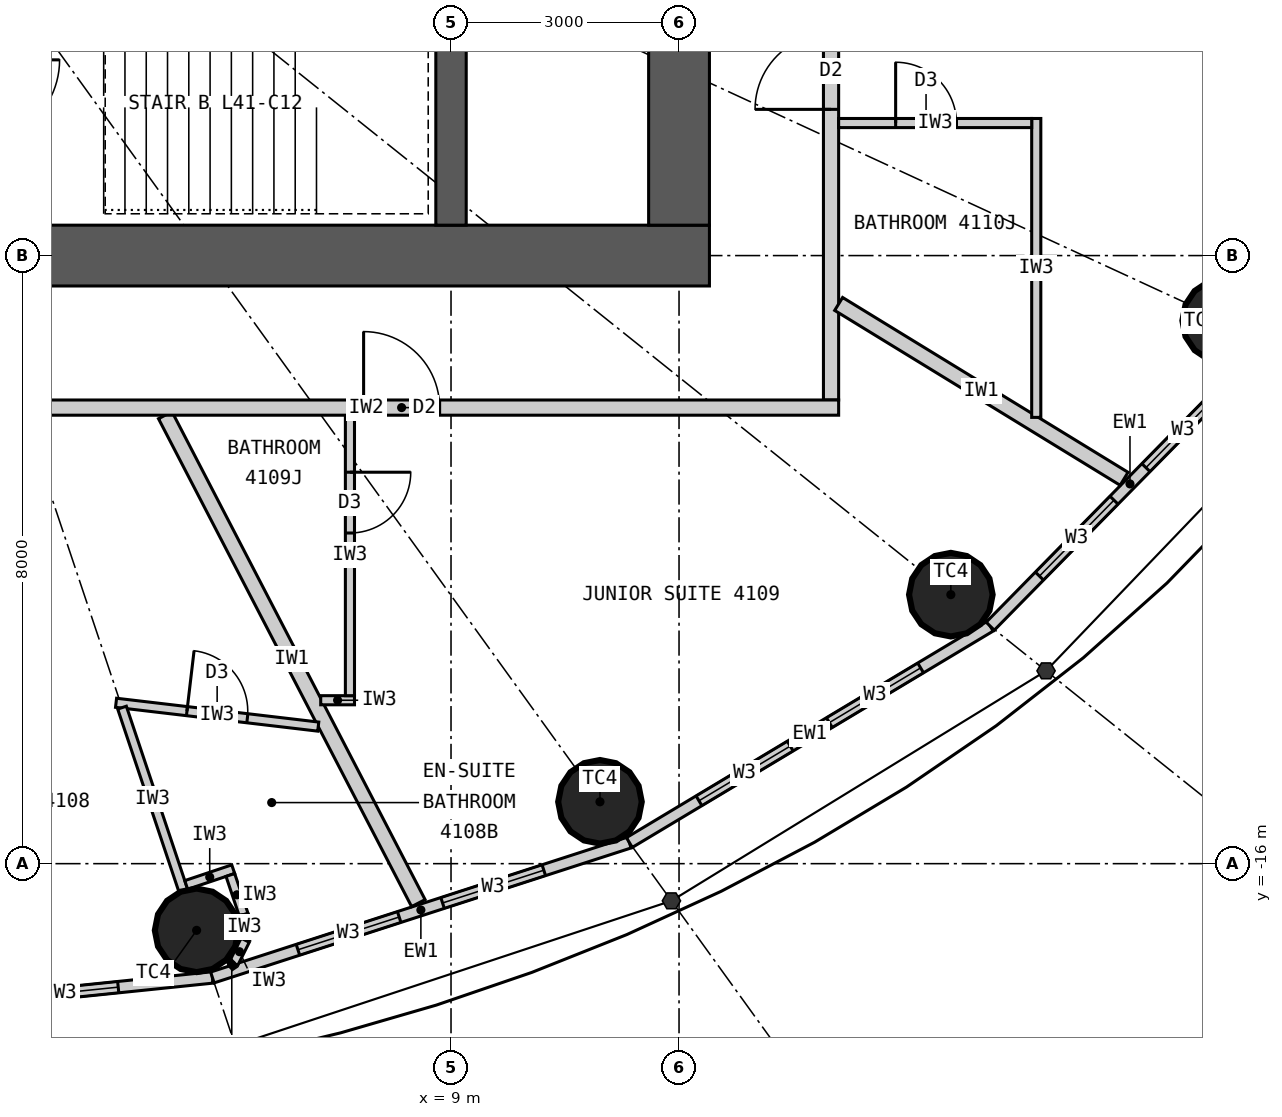
"""IFC4 building model, lengths in metres.
Left out: names, types, materials, properties, quantities, classifications, styles, units other than length and angle.
Written with IfcOpenShell. Run it as: python <this file> out.ifc"""

import sys

from ifc_helpers import new_model, si_unit, direction, frame, frame_2d, origin, origin_2d, place, context, subcontext, project, spatial, rectangle, circle, extrude, element, fill, save


model = new_model("IFC4")
c1 = context("Model", 3, precision=1e-05, world=origin(), true_north=direction((0.0, 1.0)))
c2 = subcontext(c1, "Body", "Model", "MODEL_VIEW")
j1 = project(units=[si_unit("LENGTHUNIT", "METRE"), si_unit("PLANEANGLEUNIT", "RADIAN")], contexts=[c1])
p1 = place(None, origin())
s1 = spatial("IfcSite", under=j1, at=p1, CompositionType="ELEMENT")
p2 = place(p1, origin())
s2 = spatial("IfcBuilding", under=s1, at=p2, CompositionType="ELEMENT")
p3 = place(p2, frame((0.0, 0.0, 156.6)))
s3 = spatial("IfcBuildingStorey", under=s2, at=p3, CompositionType="ELEMENT", Elevation=156.6)
for number, where, z_axis, x_axis in (
    (1, (5.653, -16.877, 0.0), (0.0, 0.0, 1.0), (1.0, 0.0, 0.0)),
    (2, (10.96, -15.186, 0.0), (0.0, 0.0, 1.0), (1.0, 0.0, 0.0)),
    (3, (15.576, -12.461, 0.0), (0.0, 0.0, 1.0), (1.0, 0.0, 0.0)),
    (4, (19.172, -8.855, 0.0), (0.0, 0.0, 1.0), (1.0, 0.0, 0.0)),
):
    element("IfcColumn", number, at=place(p3, frame(where, z_axis=z_axis, x_axis=x_axis)), inside=s3, PredefinedType="COLUMN", context=c2, shape_type="SweptSolid", body=[
        extrude(circle(Radius=0.55, at=origin_2d()), origin(), (0.0, 0.0, 1.0), 3.3),
    ])
p4 = place(p3, frame((12.4, -8.0, 0.0), z_axis=(0.0, 0.0, 1.0), x_axis=(-1.0, 0.0, 0.0)))
e5 = element("IfcWall", 5, at=p4, inside=s3, PredefinedType="SHEAR", context=c2, shape_type="SweptSolid", body=[
    extrude(rectangle(XDim=24.8, YDim=0.8, at=frame_2d((12.4, 0.0))), origin(), (0.0, 0.0, 1.0), 3.3),
])
p5 = place(p4, frame((11.1, 0.0, 0.0)))
e6 = element("IfcOpeningElement", 6, at=p5, cuts=e5, PredefinedType="OPENING", context=c2, shape_type="SweptSolid", body=[
    extrude(rectangle(XDim=1.2, YDim=2.2, at=frame_2d((0.6, 1.1))), frame((0.0, 0.41, 0.0), z_axis=(0.0, -1.0, 0.0), x_axis=(1.0, 0.0, 0.0)), (0.0, 0.0, 1.0), 0.82),
])
p6 = place(p4, frame((18.7, 0.0, 0.0)))
e7 = element("IfcOpeningElement", 7, at=p6, cuts=e5, PredefinedType="OPENING", context=c2, shape_type="SweptSolid", body=[
    extrude(rectangle(XDim=0.9, YDim=2.2, at=frame_2d((0.45, 1.1))), frame((0.0, 0.41, 0.0), z_axis=(0.0, -1.0, 0.0), x_axis=(1.0, 0.0, 0.0)), (0.0, 0.0, 1.0), 0.82),
])
p7 = place(p3, frame((12.0, -7.6, 0.0), z_axis=(0.0, 0.0, 1.0), x_axis=(0.0, 1.0, 0.0)))
e8 = element("IfcWall", 8, at=p7, inside=s3, PredefinedType="SHEAR", context=c2, shape_type="SweptSolid", body=[
    extrude(rectangle(XDim=15.2, YDim=0.8, at=frame_2d((7.6, 0.0))), origin(), (0.0, 0.0, 1.0), 3.3),
])
p8 = place(p7, frame((6.7, 0.0, 0.0)))
e9 = element("IfcOpeningElement", 9, at=p8, cuts=e8, PredefinedType="OPENING", context=c2, shape_type="SweptSolid", body=[
    extrude(rectangle(XDim=1.8, YDim=2.2, at=frame_2d((0.9, 1.1))), frame((0.0, 0.41, 0.0), z_axis=(0.0, -1.0, 0.0), x_axis=(1.0, 0.0, 0.0)), (0.0, 0.0, 1.0), 0.82),
])
p9 = place(p3, frame((9.0, -7.6, 0.0), z_axis=(0.0, 0.0, 1.0), x_axis=(0.0, 1.0, 0.0)))
e10 = element("IfcWall", 10, at=p9, inside=s3, PredefinedType="SHEAR", context=c2, shape_type="SweptSolid", body=[
    extrude(rectangle(XDim=3.1, YDim=0.4, at=frame_2d((1.55, 0.0))), origin(), (0.0, 0.0, 1.0), 3.3),
])
p10 = place(p3, frame((0.0, -18.1, 0.0), z_axis=(0.0, 0.0, 1.0), x_axis=(0.994751738032, 0.102318032045, 0.0)))
e11 = element("IfcWall", 11, at=p10, inside=s3, PredefinedType="ELEMENTEDWALL", context=c2, shape_type="SweptSolid", body=[
    extrude(rectangle(XDim=5.891, YDim=0.15, at=frame_2d((2.946, 0.0))), origin(), (0.0, 0.0, 1.0), 3.12),
])
p11 = place(p10, frame((1.246, 0.0, 0.9)))
e12 = element("IfcOpeningElement", 12, at=p11, cuts=e11, PredefinedType="OPENING", context=c2, shape_type="SweptSolid", body=[
    extrude(rectangle(XDim=1.4, YDim=1.9, at=frame_2d((0.7, 0.95))), frame((0.0, 0.085, 0.0), z_axis=(0.0, -1.0, 0.0), x_axis=(1.0, 0.0, 0.0)), (0.0, 0.0, 1.0), 0.17),
])
p12 = place(p10, frame((3.246, 0.0, 0.9)))
e13 = element("IfcOpeningElement", 13, at=p12, cuts=e11, PredefinedType="OPENING", context=c2, shape_type="SweptSolid", body=[
    extrude(rectangle(XDim=1.4, YDim=1.9, at=frame_2d((0.7, 0.95))), frame((0.0, 0.085, 0.0), z_axis=(0.0, -1.0, 0.0), x_axis=(1.0, 0.0, 0.0)), (0.0, 0.0, 1.0), 0.17),
])
p13 = place(p3, frame((5.86, -17.497, 0.0), z_axis=(0.0, 0.0, 1.0), x_axis=(0.951432482129, 0.307857486429, 0.0)))
e14 = element("IfcWall", 14, at=p13, inside=s3, PredefinedType="ELEMENTEDWALL", context=c2, shape_type="SweptSolid", body=[
    extrude(rectangle(XDim=5.766, YDim=0.15, at=frame_2d((2.883, 0.0))), origin(), (0.0, 0.0, 1.0), 3.12),
])
p14 = place(p13, frame((1.183, 0.0, 0.9)))
e15 = element("IfcOpeningElement", 15, at=p14, cuts=e14, PredefinedType="OPENING", context=c2, shape_type="SweptSolid", body=[
    extrude(rectangle(XDim=1.4, YDim=1.9, at=frame_2d((0.7, 0.95))), frame((0.0, 0.085, 0.0), z_axis=(0.0, -1.0, 0.0), x_axis=(1.0, 0.0, 0.0)), (0.0, 0.0, 1.0), 0.17),
])
p15 = place(p13, frame((3.183, 0.0, 0.9)))
e16 = element("IfcOpeningElement", 16, at=p15, cuts=e14, PredefinedType="OPENING", context=c2, shape_type="SweptSolid", body=[
    extrude(rectangle(XDim=1.4, YDim=1.9, at=frame_2d((0.7, 0.95))), frame((0.0, 0.085, 0.0), z_axis=(0.0, -1.0, 0.0), x_axis=(1.0, 0.0, 0.0)), (0.0, 0.0, 1.0), 0.17),
])
p16 = place(p3, frame((11.346, -15.722, 0.0), z_axis=(0.0, 0.0, 1.0), x_axis=(0.857695199231, 0.514158482587, 0.0)))
e17 = element("IfcWall", 17, at=p16, inside=s3, PredefinedType="ELEMENTEDWALL", context=c2, shape_type="SweptSolid", body=[
    extrude(rectangle(XDim=5.536, YDim=0.15, at=frame_2d((2.768, 0.0))), origin(), (0.0, 0.0, 1.0), 3.12),
])
p17 = place(p16, frame((1.068, 0.0, 0.9)))
e18 = element("IfcOpeningElement", 18, at=p17, cuts=e17, PredefinedType="OPENING", context=c2, shape_type="SweptSolid", body=[
    extrude(rectangle(XDim=1.4, YDim=1.9, at=frame_2d((0.7, 0.95))), frame((0.0, 0.085, 0.0), z_axis=(0.0, -1.0, 0.0), x_axis=(1.0, 0.0, 0.0)), (0.0, 0.0, 1.0), 0.17),
])
p18 = place(p16, frame((3.068, 0.0, 0.9)))
e19 = element("IfcOpeningElement", 19, at=p18, cuts=e17, PredefinedType="OPENING", context=c2, shape_type="SweptSolid", body=[
    extrude(rectangle(XDim=1.4, YDim=1.9, at=frame_2d((0.7, 0.95))), frame((0.0, 0.085, 0.0), z_axis=(0.0, -1.0, 0.0), x_axis=(1.0, 0.0, 0.0)), (0.0, 0.0, 1.0), 0.17),
])
p19 = place(p3, frame((16.095, -12.876, 0.0), z_axis=(0.0, 0.0, 1.0), x_axis=(0.700727467776, 0.71342905457, 0.0)))
e20 = element("IfcWall", 20, at=p19, inside=s3, PredefinedType="ELEMENTEDWALL", context=c2, shape_type="SweptSolid", body=[
    extrude(rectangle(XDim=5.247, YDim=0.15, at=frame_2d((2.624, 0.0))), origin(), (0.0, 0.0, 1.0), 3.12),
])
p20 = place(p19, frame((0.924, 0.0, 0.9)))
e21 = element("IfcOpeningElement", 21, at=p20, cuts=e20, PredefinedType="OPENING", context=c2, shape_type="SweptSolid", body=[
    extrude(rectangle(XDim=1.4, YDim=1.9, at=frame_2d((0.7, 0.95))), frame((0.0, 0.085, 0.0), z_axis=(0.0, -1.0, 0.0), x_axis=(1.0, 0.0, 0.0)), (0.0, 0.0, 1.0), 0.17),
])
p21 = place(p19, frame((2.924, 0.0, 0.9)))
e22 = element("IfcOpeningElement", 22, at=p21, cuts=e20, PredefinedType="OPENING", context=c2, shape_type="SweptSolid", body=[
    extrude(rectangle(XDim=1.4, YDim=1.9, at=frame_2d((0.7, 0.95))), frame((0.0, 0.085, 0.0), z_axis=(0.0, -1.0, 0.0), x_axis=(1.0, 0.0, 0.0)), (0.0, 0.0, 1.0), 0.17),
])
p22 = place(p3, frame((14.0, -9.9, 0.0), z_axis=(0.0, 0.0, 1.0), x_axis=(0.0, 1.0, 0.0)))
e23 = element("IfcWall", 23, at=p22, inside=s3, PredefinedType="PARTITIONING", context=c2, shape_type="SweptSolid", body=[
    extrude(rectangle(XDim=19.8, YDim=0.2, at=frame_2d((9.9, 0.0))), origin(), (0.0, 0.0, 1.0), 3.12),
])
p23 = place(p22, frame((3.824, 0.0, 0.0)))
e24 = element("IfcOpeningElement", 24, at=p23, cuts=e23, PredefinedType="OPENING", context=c2, shape_type="SweptSolid", body=[
    extrude(rectangle(XDim=1.0, YDim=2.2, at=frame_2d((0.5, 1.1))), frame((0.0, 0.11, 0.0), z_axis=(0.0, -1.0, 0.0), x_axis=(1.0, 0.0, 0.0)), (0.0, 0.0, 1.0), 0.22),
])
p24 = place(p22, frame((8.719, 0.0, 0.0)))
e25 = element("IfcOpeningElement", 25, at=p24, cuts=e23, PredefinedType="OPENING", context=c2, shape_type="SweptSolid", body=[
    extrude(rectangle(XDim=1.0, YDim=2.2, at=frame_2d((0.5, 1.1))), frame((0.0, 0.11, 0.0), z_axis=(0.0, -1.0, 0.0), x_axis=(1.0, 0.0, 0.0)), (0.0, 0.0, 1.0), 0.22),
])
p25 = place(p22, frame((15.482, 0.0, 0.0)))
e26 = element("IfcOpeningElement", 26, at=p25, cuts=e23, PredefinedType="OPENING", context=c2, shape_type="SweptSolid", body=[
    extrude(rectangle(XDim=1.0, YDim=2.2, at=frame_2d((0.5, 1.1))), frame((0.0, 0.11, 0.0), z_axis=(0.0, -1.0, 0.0), x_axis=(1.0, 0.0, 0.0)), (0.0, 0.0, 1.0), 0.22),
])
p26 = place(p3, frame((5.24, -10.1, 0.0), z_axis=(0.0, 0.0, 1.0), x_axis=(0.460532965373, -0.887642601391, 0.0)))
e27 = element("IfcWall", 27, at=p26, inside=s3, PredefinedType="PARTITIONING", context=c2, shape_type="SweptSolid", body=[
    extrude(rectangle(XDim=7.231, YDim=0.2, at=frame_2d((3.616, 0.0))), origin(), (0.0, 0.0, 1.0), 3.12),
])
p27 = place(p3, frame((14.1, -8.636, 0.0), z_axis=(0.0, 0.0, 1.0), x_axis=(0.852731884196, -0.522348862041, 0.0)))
e28 = element("IfcWall", 28, at=p27, inside=s3, PredefinedType="PARTITIONING", context=c2, shape_type="SweptSolid", body=[
    extrude(rectangle(XDim=4.404, YDim=0.2, at=frame_2d((2.202, 0.0))), origin(), (0.0, 0.0, 1.0), 3.12),
])
p28 = place(p3, frame((7.253, -14.197, 0.0), z_axis=(0.0, 0.0, 1.0), x_axis=(-0.993128188393, 0.117031625725, 0.0)))
e29 = element("IfcWall", 29, at=p28, inside=s3, PredefinedType="PARTITIONING", context=c2, shape_type="SweptSolid", body=[
    extrude(rectangle(XDim=2.678, YDim=0.12, at=frame_2d((1.339, 0.0))), origin(), (0.0, 0.0, 1.0), 3.12),
])
p29 = place(p28, frame((0.939, 0.0, 0.0)))
e30 = element("IfcOpeningElement", 30, at=p29, cuts=e29, PredefinedType="OPENING", context=c2, shape_type="SweptSolid", body=[
    extrude(rectangle(XDim=0.8, YDim=2.1, at=frame_2d((0.4, 1.05))), frame((0.0, 0.07, 0.0), z_axis=(0.0, -1.0, 0.0), x_axis=(1.0, 0.0, 0.0)), (0.0, 0.0, 1.0), 0.14),
])
p30 = place(p3, frame((4.671, -13.948, 0.0), z_axis=(0.0, 0.0, 1.0), x_axis=(0.317669167093, -0.948201613729, 0.0)))
e31 = element("IfcWall", 31, at=p30, inside=s3, PredefinedType="PARTITIONING", context=c2, shape_type="SweptSolid", body=[
    extrude(rectangle(XDim=2.54, YDim=0.12, at=frame_2d((1.27, 0.0))), origin(), (0.0, 0.0, 1.0), 2.42),
])
p31 = place(p3, frame((5.516, -16.28, 0.0), z_axis=(0.0, 0.0, 1.0), x_axis=(0.948157944392, 0.317799484717, 0.0)))
e32 = element("IfcWall", 32, at=p31, inside=s3, PredefinedType="PARTITIONING", context=c2, shape_type="SweptSolid", body=[
    extrude(rectangle(XDim=0.652, YDim=0.12, at=frame_2d((0.326, 0.0))), origin(), (0.0, 0.0, 1.0), 3.12),
])
p32 = place(p3, frame((6.097, -16.149, 0.0), z_axis=(0.0, 0.0, 1.0), x_axis=(0.317292604854, -0.948327687514, 0.0)))
e33 = element("IfcWall", 33, at=p32, inside=s3, PredefinedType="PARTITIONING", context=c2, shape_type="SweptSolid", body=[
    extrude(rectangle(XDim=0.55, YDim=0.12, at=frame_2d((0.275, 0.0))), origin(), (0.0, 0.0, 1.0), 3.12),
])
for number, where, z_axis, x_axis in (
    (34, (6.271, -16.67, 0.0), (0.0, 0.0, 1.0), (0.061, -0.998, 0.0)),
    (35, (6.292, -17.007, 0.0), (0.0, 0.0, 1.0), (-0.445, -0.895, 0.0)),
):
    element("IfcWall", number, at=place(p3, frame(where, z_axis=z_axis, x_axis=x_axis)), inside=s3, PredefinedType="PARTITIONING", context=c2, shape_type="SweptSolid", body=[
        extrude(rectangle(XDim=0.338, YDim=0.12, at=frame_2d((0.169, 0.0))), origin(), (0.0, 0.0, 1.0), 3.12),
    ])
p33 = place(p3, frame((6.142, -17.31, 0.0), z_axis=(0.0, 0.0, 1.0), x_axis=(-0.835039693181, -0.550189704386, 0.0)))
e36 = element("IfcWall", 36, at=p33, inside=s3, PredefinedType="PARTITIONING", context=c2, shape_type="SweptSolid", body=[
    extrude(rectangle(XDim=0.062, YDim=0.12, at=frame_2d((0.031, 0.0))), origin(), (0.0, 0.0, 1.0), 3.12),
])
p34 = place(p3, frame((7.286, -13.85, 0.0), z_axis=(0.0, 0.0, 1.0), x_axis=(1.0, 0.0, 0.0)))
e37 = element("IfcWall", 37, at=p34, inside=s3, PredefinedType="PARTITIONING", context=c2, shape_type="SweptSolid", body=[
    extrude(rectangle(XDim=0.444, YDim=0.12, at=frame_2d((0.222, 0.0))), origin(), (0.0, 0.0, 1.0), 3.12),
])
p35 = place(p3, frame((7.67, -10.1, 0.0), z_axis=(0.0, 0.0, 1.0), x_axis=(0.0, -1.0, 0.0)))
e38 = element("IfcWall", 38, at=p35, inside=s3, PredefinedType="PARTITIONING", context=c2, shape_type="SweptSolid", body=[
    extrude(rectangle(XDim=3.69, YDim=0.12, at=frame_2d((1.845, 0.0))), origin(), (0.0, 0.0, 1.0), 3.12),
])
p36 = place(p35, frame((0.75, 0.0, 0.0)))
e39 = element("IfcOpeningElement", 39, at=p36, cuts=e38, PredefinedType="OPENING", context=c2, shape_type="SweptSolid", body=[
    extrude(rectangle(XDim=0.8, YDim=2.1, at=frame_2d((0.4, 1.05))), frame((0.0, 0.07, 0.0), z_axis=(0.0, -1.0, 0.0), x_axis=(1.0, 0.0, 0.0)), (0.0, 0.0, 1.0), 0.14),
])
p37 = place(p3, frame((16.7, -10.129, 0.0), z_axis=(0.0, 0.0, 1.0), x_axis=(0.0, 1.0, 0.0)))
e40 = element("IfcWall", 40, at=p37, inside=s3, PredefinedType="PARTITIONING", context=c2, shape_type="SweptSolid", body=[
    extrude(rectangle(XDim=3.933, YDim=0.12, at=frame_2d((1.966, 0.0))), origin(), (0.0, 0.0, 1.0), 3.12),
])
p38 = place(p3, frame((14.1, -6.256, 0.0), z_axis=(0.0, 0.0, 1.0), x_axis=(1.0, 0.0, 0.0)))
e41 = element("IfcWall", 41, at=p38, inside=s3, PredefinedType="PARTITIONING", context=c2, shape_type="SweptSolid", body=[
    extrude(rectangle(XDim=2.54, YDim=0.12, at=frame_2d((1.27, 0.0))), origin(), (0.0, 0.0, 1.0), 3.12),
])
p39 = place(p38, frame((0.75, 0.0, 0.0)))
e42 = element("IfcOpeningElement", 42, at=p39, cuts=e41, PredefinedType="OPENING", context=c2, shape_type="SweptSolid", body=[
    extrude(rectangle(XDim=0.8, YDim=2.1, at=frame_2d((0.4, 1.05))), frame((0.0, 0.07, 0.0), z_axis=(0.0, -1.0, 0.0), x_axis=(1.0, 0.0, 0.0)), (0.0, 0.0, 1.0), 0.14),
])
p40 = place(p3, frame((14.1, -10.0, 0.0), z_axis=(0.0, 0.0, 1.0), x_axis=(-1.0, 0.0, 0.0)))
e43 = element("IfcWall", 43, at=p40, inside=s3, PredefinedType="PARTITIONING", context=c2, shape_type="SweptSolid", body=[
    extrude(rectangle(XDim=12.43, YDim=0.2, at=frame_2d((6.215, 0.0))), origin(), (0.0, 0.0, 1.0), 3.12),
])
p41 = place(p40, frame((5.25, 0.0, 0.0)))
e44 = element("IfcOpeningElement", 44, at=p41, cuts=e43, PredefinedType="OPENING", context=c2, shape_type="SweptSolid", body=[
    extrude(rectangle(XDim=1.0, YDim=2.2, at=frame_2d((0.5, 1.1))), frame((0.0, 0.11, 0.0), z_axis=(0.0, -1.0, 0.0), x_axis=(1.0, 0.0, 0.0)), (0.0, 0.0, 1.0), 0.22),
])
p42 = place(p12, origin())
e45 = element("IfcWindow", 45, at=p42, inside=s3, PartitioningType="SINGLE_PANEL", PredefinedType="WINDOW", context=c2, shape_type="SweptSolid", body=[
    extrude(rectangle(XDim=1.4, YDim=1.9, at=frame_2d((0.7, 0.95))), frame((0.0, 0.03, 0.0), z_axis=(0.0, -1.0, 0.0), x_axis=(1.0, 0.0, 0.0)), (0.0, 0.0, 1.0), 0.06),
])
fill(e13, e45)
p43 = place(p14, origin())
e46 = element("IfcWindow", 46, at=p43, inside=s3, PartitioningType="SINGLE_PANEL", PredefinedType="WINDOW", context=c2, shape_type="SweptSolid", body=[
    extrude(rectangle(XDim=1.4, YDim=1.9, at=frame_2d((0.7, 0.95))), frame((0.0, 0.03, 0.0), z_axis=(0.0, -1.0, 0.0), x_axis=(1.0, 0.0, 0.0)), (0.0, 0.0, 1.0), 0.06),
])
fill(e15, e46)
p44 = place(p15, origin())
e47 = element("IfcWindow", 47, at=p44, inside=s3, PartitioningType="SINGLE_PANEL", PredefinedType="WINDOW", context=c2, shape_type="SweptSolid", body=[
    extrude(rectangle(XDim=1.4, YDim=1.9, at=frame_2d((0.7, 0.95))), frame((0.0, 0.03, 0.0), z_axis=(0.0, -1.0, 0.0), x_axis=(1.0, 0.0, 0.0)), (0.0, 0.0, 1.0), 0.06),
])
fill(e16, e47)
p45 = place(p17, origin())
e48 = element("IfcWindow", 48, at=p45, inside=s3, PartitioningType="SINGLE_PANEL", PredefinedType="WINDOW", context=c2, shape_type="SweptSolid", body=[
    extrude(rectangle(XDim=1.4, YDim=1.9, at=frame_2d((0.7, 0.95))), frame((0.0, 0.03, 0.0), z_axis=(0.0, -1.0, 0.0), x_axis=(1.0, 0.0, 0.0)), (0.0, 0.0, 1.0), 0.06),
])
fill(e18, e48)
p46 = place(p18, origin())
e49 = element("IfcWindow", 49, at=p46, inside=s3, PartitioningType="SINGLE_PANEL", PredefinedType="WINDOW", context=c2, shape_type="SweptSolid", body=[
    extrude(rectangle(XDim=1.4, YDim=1.9, at=frame_2d((0.7, 0.95))), frame((0.0, 0.03, 0.0), z_axis=(0.0, -1.0, 0.0), x_axis=(1.0, 0.0, 0.0)), (0.0, 0.0, 1.0), 0.06),
])
fill(e19, e49)
p47 = place(p20, origin())
e50 = element("IfcWindow", 50, at=p47, inside=s3, PartitioningType="SINGLE_PANEL", PredefinedType="WINDOW", context=c2, shape_type="SweptSolid", body=[
    extrude(rectangle(XDim=1.4, YDim=1.9, at=frame_2d((0.7, 0.95))), frame((0.0, 0.03, 0.0), z_axis=(0.0, -1.0, 0.0), x_axis=(1.0, 0.0, 0.0)), (0.0, 0.0, 1.0), 0.06),
])
fill(e21, e50)
p48 = place(p21, origin())
e51 = element("IfcWindow", 51, at=p48, inside=s3, PartitioningType="SINGLE_PANEL", PredefinedType="WINDOW", context=c2, shape_type="SweptSolid", body=[
    extrude(rectangle(XDim=1.4, YDim=1.9, at=frame_2d((0.7, 0.95))), frame((0.0, 0.03, 0.0), z_axis=(0.0, -1.0, 0.0), x_axis=(1.0, 0.0, 0.0)), (0.0, 0.0, 1.0), 0.06),
])
fill(e22, e51)
p49 = place(p29, origin())
e52 = element("IfcDoor", 52, at=p49, inside=s3, OperationType="SINGLE_SWING_RIGHT", PredefinedType="DOOR", context=c2, shape_type="SweptSolid", body=[
    extrude(rectangle(XDim=0.8, YDim=2.1, at=frame_2d((0.4, 1.05))), frame((0.0, 0.025, 0.0), z_axis=(0.0, -1.0, 0.0), x_axis=(1.0, 0.0, 0.0)), (0.0, 0.0, 1.0), 0.05),
])
fill(e30, e52)
p50 = place(p36, origin())
e53 = element("IfcDoor", 53, at=p50, inside=s3, OperationType="SINGLE_SWING_LEFT", PredefinedType="DOOR", context=c2, shape_type="SweptSolid", body=[
    extrude(rectangle(XDim=0.8, YDim=2.1, at=frame_2d((0.4, 1.05))), frame((0.0, 0.025, 0.0), z_axis=(0.0, -1.0, 0.0), x_axis=(1.0, 0.0, 0.0)), (0.0, 0.0, 1.0), 0.05),
])
fill(e39, e53)
p51 = place(p41, origin())
e54 = element("IfcDoor", 54, at=p51, inside=s3, OperationType="SINGLE_SWING_RIGHT", PredefinedType="DOOR", context=c2, shape_type="SweptSolid", body=[
    extrude(rectangle(XDim=1.0, YDim=2.2, at=frame_2d((0.5, 1.1))), frame((0.0, 0.025, 0.0), z_axis=(0.0, -1.0, 0.0), x_axis=(1.0, 0.0, 0.0)), (0.0, 0.0, 1.0), 0.05),
])
fill(e44, e54)
p52 = place(p39, origin())
e55 = element("IfcDoor", 55, at=p52, inside=s3, OperationType="SINGLE_SWING_LEFT", PredefinedType="DOOR", context=c2, shape_type="SweptSolid", body=[
    extrude(rectangle(XDim=0.8, YDim=2.1, at=frame_2d((0.4, 1.05))), frame((0.0, 0.025, 0.0), z_axis=(0.0, -1.0, 0.0), x_axis=(1.0, 0.0, 0.0)), (0.0, 0.0, 1.0), 0.05),
])
fill(e42, e55)
p53 = place(p23, origin())
e56 = element("IfcDoor", 56, at=p53, inside=s3, OperationType="SINGLE_SWING_LEFT", PredefinedType="DOOR", context=c2, shape_type="SweptSolid", body=[
    extrude(rectangle(XDim=1.0, YDim=2.2, at=frame_2d((0.5, 1.1))), frame((0.0, 0.025, 0.0), z_axis=(0.0, -1.0, 0.0), x_axis=(1.0, 0.0, 0.0)), (0.0, 0.0, 1.0), 0.05),
])
fill(e24, e56)
save(model, sys.argv[1])
